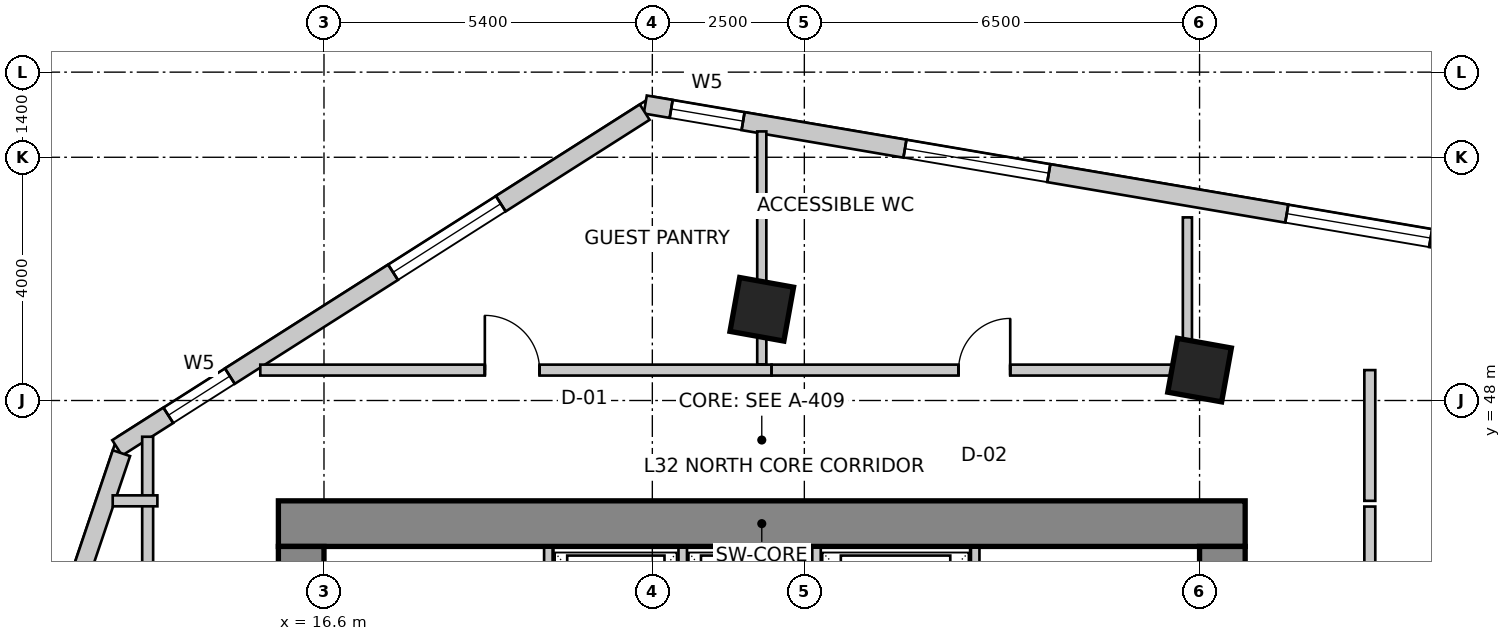
"""IFC4 building model, lengths in metres.
Left out: names, types, materials, properties, quantities, classifications, styles, units other than length and angle.
Written with IfcOpenShell. Run it as: python <this file> out.ifc"""

import sys

from ifc_helpers import new_model, si_unit, direction, frame, frame_2d, origin, origin_2d, place, context, subcontext, project, spatial, rectangle, extrude, source, transform, mapped, element, fill, save


model = new_model("IFC4")
c1 = context("Model", 3, precision=1e-05, world=origin(), true_north=direction((0.0, 1.0)))
c2 = subcontext(c1, "Body", "Model", "MODEL_VIEW")
j1 = project(units=[si_unit("LENGTHUNIT", "METRE"), si_unit("PLANEANGLEUNIT", "RADIAN")], contexts=[c1])
p1 = place(None, origin())
s1 = spatial("IfcSite", under=j1, at=p1, CompositionType="ELEMENT")
p2 = place(p1, origin())
s2 = spatial("IfcBuilding", under=s1, at=p2, CompositionType="ELEMENT")
p3 = place(p2, frame((0.0, 0.0, 132.2)))
s3 = spatial("IfcBuildingStorey", under=s2, at=p3, CompositionType="ELEMENT", Elevation=132.2)
p4 = place(p3, frame((15.85, 45.975, 0.0), z_axis=(0.0, 0.0, 1.0), x_axis=(1.0, 0.0, 0.0)))
e1 = element("IfcWall", 1, at=p4, inside=s3, PredefinedType="SHEAR", context=c2, shape_type="SweptSolid", body=[
    extrude(rectangle(XDim=15.9, YDim=0.75, at=frame_2d((7.95, 0.0))), origin(), (0.0, 0.0, 1.0), 3.6),
])
p5 = place(p3, frame((16.225, 34.2, 0.0), z_axis=(0.0, 0.0, 1.0), x_axis=(0.0, 1.0, 0.0)))
e2 = element("IfcWall", 2, at=p5, inside=s3, PredefinedType="SHEAR", context=c2, shape_type="SweptSolid", body=[
    extrude(rectangle(XDim=11.4, YDim=0.75, at=frame_2d((5.7, 0.0))), origin(), (0.0, 0.0, 1.0), 3.6),
])
m1 = source(origin(), c2, "Body", "SweptSolid", [
    extrude(rectangle(XDim=1.1, YDim=2.15, at=frame_2d((0.55, 1.075))), frame((0.0, 0.385, 0.0), z_axis=(0.0, -1.0, 0.0), x_axis=(1.0, 0.0, 0.0)), (0.0, 0.0, 1.0), 0.77),
])
p6 = place(p5, frame((7.15, 0.0, 0.0)))
e3 = element("IfcOpeningElement", 3, at=p6, cuts=e2, PredefinedType="OPENING", context=c2, shape_type="MappedRepresentation", body=[
    mapped(m1, transform((0.0, 0.0, 0.0), scale=1.0)),
])
p7 = place(p3, frame((31.375, 34.2, 0.0), z_axis=(0.0, 0.0, 1.0), x_axis=(0.0, 1.0, 0.0)))
e4 = element("IfcWall", 4, at=p7, inside=s3, PredefinedType="SHEAR", context=c2, shape_type="SweptSolid", body=[
    extrude(rectangle(XDim=11.4, YDim=0.75, at=frame_2d((5.7, 0.0))), origin(), (0.0, 0.0, 1.0), 3.6),
])
p8 = place(p7, frame((7.35, 0.0, 0.0)))
e5 = element("IfcOpeningElement", 5, at=p8, cuts=e4, PredefinedType="OPENING", context=c2, shape_type="MappedRepresentation", body=[
    mapped(m1, transform((0.0, 0.0, 0.0), scale=1.0)),
])
m2 = source(origin(), c2, "Body", "SweptSolid", [
    extrude(rectangle(XDim=0.9, YDim=0.9, at=origin_2d()), origin(), (0.0, 0.0, 1.0), 3.6),
])
for number, where, z_axis, x_axis in (
    (6, (23.8, 49.5, 0.0), (0.0, 0.0, 1.0), (0.984, -0.177, 0.0)),
    (7, (31.0, 48.5, 0.0), (0.0, 0.0, 1.0), (0.984, -0.177, 0.0)),
):
    element("IfcColumn", number, at=place(p3, frame(where, z_axis=z_axis, x_axis=x_axis)), inside=s3, PredefinedType="COLUMN", context=c2, shape_type="MappedRepresentation", body=[
        mapped(m2, transform((0.0, 0.0, 0.0), scale=1.0)),
    ])
p9 = place(p3, frame((53.561, 47.48, 0.0), z_axis=(0.0, 0.0, 1.0), x_axis=(-0.985845173895, 0.167658262868, 0.0)))
e8 = element("IfcWall", 8, at=p9, inside=s3, PredefinedType="SOLIDWALL", context=c2, shape_type="SweptSolid", body=[
    extrude(rectangle(XDim=32.132, YDim=0.3, at=frame_2d((16.066, 0.0))), origin(), (0.0, 0.0, 1.0), 3.35),
])
m3 = source(origin(), c2, "Body", "SweptSolid", [
    extrude(rectangle(XDim=2.4, YDim=2.2, at=frame_2d((1.2, 1.1))), frame((0.0, 0.16, 0.0), z_axis=(0.0, -1.0, 0.0), x_axis=(1.0, 0.0, 0.0)), (0.0, 0.0, 1.0), 0.32),
])
p10 = place(p9, frame((2.404, 0.0, 0.85)))
e9 = element("IfcOpeningElement", 9, at=p10, cuts=e8, PredefinedType="OPENING", context=c2, shape_type="MappedRepresentation", body=[
    mapped(m3, transform((0.0, 0.0, 0.0), scale=1.0)),
])
p11 = place(p9, frame((8.708, 0.0, 0.85)))
e10 = element("IfcOpeningElement", 10, at=p11, cuts=e8, PredefinedType="OPENING", context=c2, shape_type="MappedRepresentation", body=[
    mapped(m3, transform((0.0, 0.0, 0.0), scale=1.0)),
])
m4 = source(origin(), c2, "Body", "SweptSolid", [
    extrude(rectangle(XDim=2.1, YDim=2.0, at=frame_2d((1.05, 1.0))), frame((0.0, 0.16, 0.0), z_axis=(0.0, -1.0, 0.0), x_axis=(1.0, 0.0, 0.0)), (0.0, 0.0, 1.0), 0.32),
])
p12 = place(p9, frame((14.019, 0.0, 0.85)))
e11 = element("IfcOpeningElement", 11, at=p12, cuts=e8, PredefinedType="OPENING", context=c2, shape_type="MappedRepresentation", body=[
    mapped(m4, transform((0.0, 0.0, 0.0), scale=1.0)),
])
p13 = place(p9, frame((19.03, 0.0, 0.85)))
e12 = element("IfcOpeningElement", 12, at=p13, cuts=e8, PredefinedType="OPENING", context=c2, shape_type="MappedRepresentation", body=[
    mapped(m3, transform((0.0, 0.0, 0.0), scale=1.0)),
])
p14 = place(p9, frame((25.4, 0.0, 0.85)))
e13 = element("IfcOpeningElement", 13, at=p14, cuts=e8, PredefinedType="OPENING", context=c2, shape_type="MappedRepresentation", body=[
    mapped(m3, transform((0.0, 0.0, 0.0), scale=1.0)),
])
m5 = source(origin(), c2, "Body", "SweptSolid", [
    extrude(rectangle(XDim=1.2, YDim=1.6, at=frame_2d((0.6, 0.8))), frame((0.0, 0.16, 0.0), z_axis=(0.0, -1.0, 0.0), x_axis=(1.0, 0.0, 0.0)), (0.0, 0.0, 1.0), 0.32),
])
p15 = place(p9, frame((30.5, 0.0, 0.85)))
e14 = element("IfcOpeningElement", 14, at=p15, cuts=e8, PredefinedType="OPENING", context=c2, shape_type="MappedRepresentation", body=[
    mapped(m5, transform((0.0, 0.0, 0.0), scale=1.0)),
])
p16 = place(p3, frame((21.875, 52.742, 0.0), z_axis=(0.0, 0.0, 1.0), x_axis=(-0.843662465249, -0.536873956092, 0.0)))
e15 = element("IfcWall", 15, at=p16, inside=s3, PredefinedType="SOLIDWALL", context=c2, shape_type="SweptSolid", body=[
    extrude(rectangle(XDim=10.284, YDim=0.3, at=frame_2d((5.142, 0.0))), origin(), (0.0, 0.0, 1.0), 3.35),
])
p17 = place(p16, frame((2.806, 0.0, 0.85)))
e16 = element("IfcOpeningElement", 16, at=p17, cuts=e15, PredefinedType="OPENING", context=c2, shape_type="MappedRepresentation", body=[
    mapped(m4, transform((0.0, 0.0, 0.0), scale=1.0)),
])
p18 = place(p16, frame((8.087, 0.0, 0.85)))
e17 = element("IfcOpeningElement", 17, at=p18, cuts=e15, PredefinedType="OPENING", context=c2, shape_type="MappedRepresentation", body=[
    mapped(m5, transform((0.0, 0.0, 0.0), scale=1.0)),
])
p19 = place(p3, frame((13.269, 47.134, 0.0), z_axis=(0.0, 0.0, 1.0), x_axis=(-0.319929596295, -0.947441319246, 0.0)))
e18 = element("IfcWall", 18, at=p19, inside=s3, PredefinedType="SOLIDWALL", context=c2, shape_type="SweptSolid", body=[
    extrude(rectangle(XDim=16.134, YDim=0.3, at=frame_2d((8.067, 0.0))), origin(), (0.0, 0.0, 1.0), 3.35),
])
p20 = place(p19, frame((2.276, 0.0, 0.85)))
e19 = element("IfcOpeningElement", 19, at=p20, cuts=e18, PredefinedType="OPENING", context=c2, shape_type="MappedRepresentation", body=[
    mapped(m3, transform((0.0, 0.0, 0.0), scale=1.0)),
])
p21 = place(p19, frame((7.361, 0.0, 0.85)))
e20 = element("IfcOpeningElement", 20, at=p21, cuts=e18, PredefinedType="OPENING", context=c2, shape_type="MappedRepresentation", body=[
    mapped(m4, transform((0.0, 0.0, 0.0), scale=1.0)),
])
p22 = place(p19, frame((12.147, 0.0, 0.85)))
e21 = element("IfcOpeningElement", 21, at=p22, cuts=e18, PredefinedType="OPENING", context=c2, shape_type="MappedRepresentation", body=[
    mapped(m3, transform((0.0, 0.0, 0.0), scale=1.0)),
])
for number, where, z_axis, x_axis in (
    (22, (20.29, 43.28, 0.0), (0.0, 0.0, 1.0), (0.0, 1.0, 0.0)),
    (23, (27.31, 43.28, 0.0), (0.0, 0.0, 1.0), (0.0, 1.0, 0.0)),
):
    element("IfcWall", number, at=place(p3, frame(where, z_axis=z_axis, x_axis=x_axis)), inside=s3, PredefinedType="SOLIDWALL", context=c2, shape_type="SweptSolid", body=[
        extrude(rectangle(XDim=2.3, YDim=0.14, at=frame_2d((1.15, 0.0))), origin(), (0.0, 0.0, 1.0), 3.35),
    ])
for number, where, z_axis, x_axis in (
    (24, (22.5, 43.02, 0.0), (0.0, 0.0, 1.0), (0.0, 1.0, 0.0)),
    (25, (24.7, 43.02, 0.0), (0.0, 0.0, 1.0), (0.0, 1.0, 0.0)),
):
    element("IfcWall", number, at=place(p3, frame(where, z_axis=z_axis, x_axis=x_axis)), inside=s3, PredefinedType="SOLIDWALL", context=c2, shape_type="SweptSolid", body=[
        extrude(rectangle(XDim=2.56, YDim=0.14, at=frame_2d((1.28, 0.0))), origin(), (0.0, 0.0, 1.0), 3.35),
    ])
p23 = place(p3, frame((13.7, 33.544, 0.0), z_axis=(0.0, 0.0, 1.0), x_axis=(0.0, 1.0, 0.0)))
e26 = element("IfcWall", 26, at=p23, inside=s3, PredefinedType="PARTITIONING", context=c2, shape_type="SweptSolid", body=[
    extrude(rectangle(XDim=13.86, YDim=0.18, at=frame_2d((6.93, 0.0))), origin(), (0.0, 0.0, 1.0), 2.492),
])
m6 = source(origin(), c2, "Body", "SweptSolid", [
    extrude(rectangle(XDim=0.9, YDim=2.15, at=frame_2d((0.45, 1.075))), frame((0.0, 0.1, 0.0), z_axis=(0.0, -1.0, 0.0), x_axis=(1.0, 0.0, 0.0)), (0.0, 0.0, 1.0), 0.2),
])
p24 = place(p23, frame((4.253, 0.0, 0.0)))
e27 = element("IfcOpeningElement", 27, at=p24, cuts=e26, PredefinedType="OPENING", context=c2, shape_type="MappedRepresentation", body=[
    mapped(m6, transform((0.0, 0.0, 0.0), scale=1.0)),
])
p25 = place(p3, frame((13.86, 46.35, 0.0), z_axis=(0.0, 0.0, 1.0), x_axis=(-1.0, 0.0, 0.0)))
e28 = element("IfcWall", 28, at=p25, inside=s3, PredefinedType="PARTITIONING", context=c2, shape_type="SweptSolid", body=[
    extrude(rectangle(XDim=0.735, YDim=0.18, at=frame_2d((0.367, 0.0))), origin(), (0.0, 0.0, 1.0), 3.35),
])
p26 = place(p3, frame((15.552, 48.5, 0.0), z_axis=(0.0, 0.0, 1.0), x_axis=(1.0, 0.0, 0.0)))
e29 = element("IfcWall", 29, at=p26, inside=s3, PredefinedType="PARTITIONING", context=c2, shape_type="SweptSolid", body=[
    extrude(rectangle(XDim=8.407, YDim=0.18, at=frame_2d((4.204, 0.0))), origin(), (0.0, 0.0, 1.0), 3.034),
])
p27 = place(p26, frame((3.693, 0.0, 0.0)))
e30 = element("IfcOpeningElement", 30, at=p27, cuts=e29, PredefinedType="OPENING", context=c2, shape_type="MappedRepresentation", body=[
    mapped(m6, transform((0.0, 0.0, 0.0), scale=1.0)),
])
p28 = place(p3, frame((23.962, 48.5, 0.0), z_axis=(0.0, 0.0, 1.0), x_axis=(1.0, 0.0, 0.0)))
e31 = element("IfcWall", 31, at=p28, inside=s3, PredefinedType="PARTITIONING", context=c2, shape_type="SweptSolid", body=[
    extrude(rectangle(XDim=6.998, YDim=0.18, at=frame_2d((3.499, 0.0))), origin(), (0.0, 0.0, 1.0), 2.492),
])
m7 = source(origin(), c2, "Body", "SweptSolid", [
    extrude(rectangle(XDim=0.85, YDim=2.15, at=frame_2d((0.425, 1.075))), frame((0.0, 0.1, 0.0), z_axis=(0.0, -1.0, 0.0), x_axis=(1.0, 0.0, 0.0)), (0.0, 0.0, 1.0), 0.2),
])
p29 = place(p28, frame((3.074, 0.0, 0.0)))
e32 = element("IfcOpeningElement", 32, at=p29, cuts=e31, PredefinedType="OPENING", context=c2, shape_type="MappedRepresentation", body=[
    mapped(m7, transform((0.0, 0.0, 0.0), scale=1.0)),
])
p30 = place(p3, frame((33.8, 48.5, 0.0), z_axis=(0.0, 0.0, 1.0), x_axis=(0.0, -1.0, 0.0)))
e33 = element("IfcWall", 33, at=p30, inside=s3, PredefinedType="PARTITIONING", context=c2, shape_type="SweptSolid", body=[
    extrude(rectangle(XDim=2.15, YDim=0.18, at=frame_2d((1.075, 0.0))), origin(), (0.0, 0.0, 1.0), 2.492),
])
p31 = place(p3, frame((33.8, 46.256, 0.0), z_axis=(0.0, 0.0, 1.0), x_axis=(0.0, -1.0, 0.0)))
e34 = element("IfcWall", 34, at=p31, inside=s3, PredefinedType="PARTITIONING", context=c2, shape_type="SweptSolid", body=[
    extrude(rectangle(XDim=10.056, YDim=0.18, at=frame_2d((5.028, 0.0))), origin(), (0.0, 0.0, 1.0), 2.922),
])
m8 = source(origin(), c2, "Body", "SweptSolid", [
    extrude(rectangle(XDim=1.6, YDim=2.15, at=frame_2d((0.8, 1.075))), frame((0.0, 0.1, 0.0), z_axis=(0.0, -1.0, 0.0), x_axis=(1.0, 0.0, 0.0)), (0.0, 0.0, 1.0), 0.2),
])
p32 = place(p31, frame((4.167, 0.0, 0.0)))
e35 = element("IfcOpeningElement", 35, at=p32, cuts=e34, PredefinedType="OPENING", context=c2, shape_type="MappedRepresentation", body=[
    mapped(m8, transform((0.0, 0.0, 0.0), scale=1.0)),
])
p33 = place(p3, frame((23.8, 52.425, 0.0), z_axis=(0.0, 0.0, 1.0), x_axis=(0.0, -1.0, 0.0)))
e36 = element("IfcWall", 36, at=p33, inside=s3, PredefinedType="PARTITIONING", context=c2, shape_type="SweptSolid", body=[
    extrude(rectangle(XDim=3.831, YDim=0.15, at=frame_2d((1.916, 0.0))), origin(), (0.0, 0.0, 1.0), 2.492),
])
p34 = place(p3, frame((30.8, 51.011, 0.0), z_axis=(0.0, 0.0, 1.0), x_axis=(0.0, -1.0, 0.0)))
e37 = element("IfcWall", 37, at=p34, inside=s3, PredefinedType="PARTITIONING", context=c2, shape_type="SweptSolid", body=[
    extrude(rectangle(XDim=2.292, YDim=0.15, at=frame_2d((1.146, 0.0))), origin(), (0.0, 0.0, 1.0), 3.35),
])
m9 = source(origin(), c2, "Body", "SweptSolid", [
    extrude(rectangle(XDim=2.4, YDim=2.2, at=frame_2d((1.2, 1.1))), frame((0.0, -0.015, 0.0), z_axis=(0.0, -1.0, 0.0), x_axis=(1.0, 0.0, 0.0)), (0.0, 0.0, 1.0), 0.06),
])
p35 = place(p13, origin())
e38 = element("IfcWindow", 38, at=p35, inside=s3, PartitioningType="SINGLE_PANEL", PredefinedType="WINDOW", context=c2, shape_type="MappedRepresentation", body=[
    mapped(m9, transform((0.0, 0.0, 0.0), scale=1.0)),
])
fill(e12, e38)
p36 = place(p14, origin())
e39 = element("IfcWindow", 39, at=p36, inside=s3, PartitioningType="SINGLE_PANEL", PredefinedType="WINDOW", context=c2, shape_type="MappedRepresentation", body=[
    mapped(m9, transform((0.0, 0.0, 0.0), scale=1.0)),
])
fill(e13, e39)
m10 = source(origin(), c2, "Body", "SweptSolid", [
    extrude(rectangle(XDim=1.2, YDim=1.6, at=frame_2d((0.6, 0.8))), frame((0.0, -0.015, 0.0), z_axis=(0.0, -1.0, 0.0), x_axis=(1.0, 0.0, 0.0)), (0.0, 0.0, 1.0), 0.06),
])
p37 = place(p15, origin())
e40 = element("IfcWindow", 40, at=p37, inside=s3, PartitioningType="SINGLE_PANEL", PredefinedType="WINDOW", context=c2, shape_type="MappedRepresentation", body=[
    mapped(m10, transform((0.0, 0.0, 0.0), scale=1.0)),
])
fill(e14, e40)
m11 = source(origin(), c2, "Body", "SweptSolid", [
    extrude(rectangle(XDim=2.1, YDim=2.0, at=frame_2d((1.05, 1.0))), frame((0.0, -0.015, 0.0), z_axis=(0.0, -1.0, 0.0), x_axis=(1.0, 0.0, 0.0)), (0.0, 0.0, 1.0), 0.06),
])
p38 = place(p17, origin())
e41 = element("IfcWindow", 41, at=p38, inside=s3, PartitioningType="SINGLE_PANEL", PredefinedType="WINDOW", context=c2, shape_type="MappedRepresentation", body=[
    mapped(m11, transform((0.0, 0.0, 0.0), scale=1.0)),
])
fill(e16, e41)
p39 = place(p18, origin())
e42 = element("IfcWindow", 42, at=p39, inside=s3, PartitioningType="SINGLE_PANEL", PredefinedType="WINDOW", context=c2, shape_type="MappedRepresentation", body=[
    mapped(m10, transform((0.0, 0.0, 0.0), scale=1.0)),
])
fill(e17, e42)
m12 = source(origin(), c2, "Body", "SweptSolid", [
    extrude(rectangle(XDim=0.9, YDim=2.15, at=frame_2d((0.45, 1.075))), frame((0.0, 0.025, 0.0), z_axis=(0.0, -1.0, 0.0), x_axis=(1.0, 0.0, 0.0)), (0.0, 0.0, 1.0), 0.05),
])
p40 = place(p27, origin())
e43 = element("IfcDoor", 43, at=p40, inside=s3, OperationType="SINGLE_SWING_LEFT", PredefinedType="DOOR", context=c2, shape_type="MappedRepresentation", body=[
    mapped(m12, transform((0.0, 0.0, 0.0), scale=1.0)),
])
fill(e30, e43)
m13 = source(origin(), c2, "Body", "SweptSolid", [
    extrude(rectangle(XDim=0.85, YDim=2.15, at=frame_2d((0.425, 1.075))), frame((0.0, 0.025, 0.0), z_axis=(0.0, -1.0, 0.0), x_axis=(1.0, 0.0, 0.0)), (0.0, 0.0, 1.0), 0.05),
])
p41 = place(p29, origin())
e44 = element("IfcDoor", 44, at=p41, inside=s3, OperationType="SINGLE_SWING_RIGHT", PredefinedType="DOOR", context=c2, shape_type="MappedRepresentation", body=[
    mapped(m13, transform((0.0, 0.0, 0.0), scale=1.0)),
])
fill(e32, e44)
save(model, sys.argv[1])
